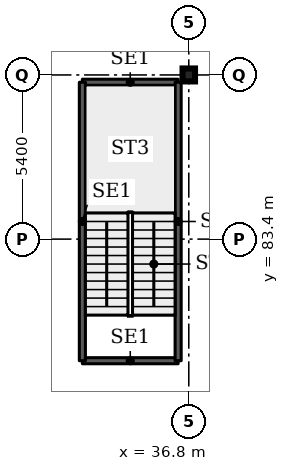
"""IFC4 building model, lengths in metres.
Left out: names, types, materials, properties, quantities, classifications, styles, units other than length and angle.
Written with IfcOpenShell. Run it as: python <this file> out.ifc"""

import sys

from ifc_helpers import new_model, si_unit, direction, frame, frame_2d, origin, origin_2d, place, context, subcontext, project, spatial, rectangle, i_section, extrude, element, save


model = new_model("IFC4")
c1 = context("Model", 3, precision=1e-05, world=origin(), true_north=direction((0.0, 1.0)))
c2 = subcontext(c1, "Body", "Model", "MODEL_VIEW")
j1 = project(units=[si_unit("LENGTHUNIT", "METRE"), si_unit("PLANEANGLEUNIT", "RADIAN")], contexts=[c1])
p1 = place(None, origin())
s1 = spatial("IfcSite", under=j1, at=p1, CompositionType="ELEMENT")
p2 = place(p1, origin())
s2 = spatial("IfcBuilding", under=s1, at=p2, CompositionType="ELEMENT")
p3 = place(p2, frame((0.0, 0.0, 17.0)))
s3 = spatial("IfcBuildingStorey", under=s2, at=p3, CompositionType="ELEMENT", Elevation=17.0)
p4 = place(p3, frame((36.8, 88.8, 0.0), z_axis=(0.0, 0.0, 1.0), x_axis=(1.0, 0.0, 0.0)))
e1 = element("IfcColumn", 1, at=p4, inside=s3, PredefinedType="COLUMN", context=c2, shape_type="SweptSolid", body=[
    extrude(i_section(OverallWidth=0.409, OverallDepth=0.425, WebThickness=0.033, FlangeThickness=0.052, FilletRadius=0.013, at=origin_2d()), origin(), (0.0, 0.0, 1.0), 4.5),
])
for number, where, z_axis, x_axis in (
    (2, (33.3, 79.4, 0.0), (0.0, 0.0, 1.0), (1.0, 0.0, 0.0)),
    (3, (33.3, 88.56, 0.0), (0.0, 0.0, 1.0), (1.0, 0.0, 0.0)),
):
    element("IfcWall", number, at=place(p3, frame(where, z_axis=z_axis, x_axis=x_axis)), inside=s3, PredefinedType="SHEAR", context=c2, shape_type="SweptSolid", body=[
        extrude(rectangle(XDim=3.15, YDim=0.2, at=frame_2d((1.575, 0.0))), origin(), (0.0, 0.0, 1.0), 4.5),
    ])
for number, where, z_axis, x_axis in (
    (4, (33.3, 79.4, 0.0), (0.0, 0.0, 1.0), (0.0, 1.0, 0.0)),
    (5, (36.45, 79.4, 0.0), (0.0, 0.0, 1.0), (0.0, 1.0, 0.0)),
):
    element("IfcWall", number, at=place(p3, frame(where, z_axis=z_axis, x_axis=x_axis)), inside=s3, PredefinedType="SHEAR", context=c2, shape_type="SweptSolid", body=[
        extrude(rectangle(XDim=9.16, YDim=0.2, at=frame_2d((4.58, 0.0))), origin(), (0.0, 0.0, 1.0), 4.5),
    ])
save(model, sys.argv[1])
